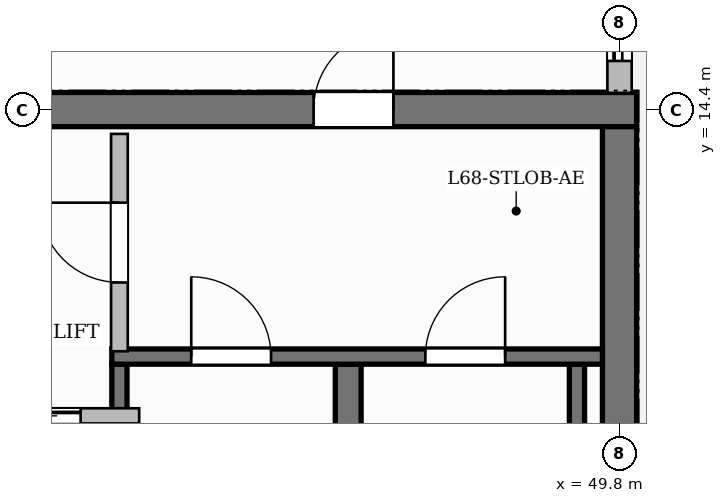
"""IFC4 building model, lengths in metres.
Left out: names, types, materials, properties, quantities, classifications, styles, units other than length and angle.
Written with IfcOpenShell. Run it as: python <this file> out.ifc"""

import sys

from ifc_helpers import new_model, si_unit, direction, frame, frame_2d, origin, place, context, subcontext, project, spatial, rectangle, extrude, source, transform, mapped, element, fill, save


model = new_model("IFC4")
c1 = context("Model", 3, precision=1e-05, world=origin(), true_north=direction((0.0, 1.0)))
c2 = subcontext(c1, "Body", "Model", "MODEL_VIEW")
j1 = project(units=[si_unit("LENGTHUNIT", "METRE"), si_unit("PLANEANGLEUNIT", "RADIAN")], contexts=[c1])
p1 = place(None, origin())
s1 = spatial("IfcSite", under=j1, at=p1, CompositionType="ELEMENT")
p2 = place(p1, origin())
s2 = spatial("IfcBuilding", under=s1, at=p2, CompositionType="ELEMENT")
p3 = place(p2, frame((0.0, 0.0, 271.2)))
s3 = spatial("IfcBuildingStorey", under=s2, at=p3, CompositionType="ELEMENT", Elevation=271.2)
p4 = place(p3, frame((34.575, 14.4, 0.0), z_axis=(0.0, 0.0, 1.0), x_axis=(1.0, 0.0, 0.0)))
e1 = element("IfcWall", 1, at=p4, inside=s3, PredefinedType="SHEAR", context=c2, shape_type="SweptSolid", body=[
    extrude(rectangle(XDim=15.45, YDim=0.45, at=frame_2d((7.725, 0.0))), origin(), (0.0, 0.0, 1.0), 3.85),
])
p5 = place(p4, frame((5.355, 0.0, 0.0)))
e2 = element("IfcOpeningElement", 2, at=p5, cuts=e1, PredefinedType="OPENING", context=c2, shape_type="SweptSolid", body=[
    extrude(rectangle(XDim=1.5, YDim=2.2, at=frame_2d((0.75, 1.1))), frame((0.0, 0.235, 0.0), z_axis=(0.0, -1.0, 0.0), x_axis=(1.0, 0.0, 0.0)), (0.0, 0.0, 1.0), 0.47),
])
p6 = place(p4, frame((1.57, 0.0, 0.0)))
e3 = element("IfcOpeningElement", 3, at=p6, cuts=e1, PredefinedType="OPENING", context=c2, shape_type="SweptSolid", body=[
    extrude(rectangle(XDim=1.05, YDim=2.15, at=frame_2d((0.525, 1.075))), frame((0.0, 0.235, 0.0), z_axis=(0.0, -1.0, 0.0), x_axis=(1.0, 0.0, 0.0)), (0.0, 0.0, 1.0), 0.47),
])
p7 = place(p4, frame((11.2, 0.0, 0.0)))
e4 = element("IfcOpeningElement", 4, at=p7, cuts=e1, PredefinedType="OPENING", context=c2, shape_type="SweptSolid", body=[
    extrude(rectangle(XDim=1.05, YDim=2.15, at=frame_2d((0.525, 1.075))), frame((0.0, 0.235, 0.0), z_axis=(0.0, -1.0, 0.0), x_axis=(1.0, 0.0, 0.0)), (0.0, 0.0, 1.0), 0.47),
])
p8 = place(p3, frame((49.8, 3.825, 0.0), z_axis=(0.0, 0.0, 1.0), x_axis=(0.0, 1.0, 0.0)))
e5 = element("IfcWall", 5, at=p8, inside=s3, PredefinedType="SHEAR", context=c2, shape_type="SweptSolid", body=[
    extrude(rectangle(XDim=10.35, YDim=0.45, at=frame_2d((5.175, 0.0))), origin(), (0.0, 0.0, 1.0), 3.85),
])
p9 = place(p3, frame((43.22, 4.1, 0.0), z_axis=(0.0, 0.0, 1.0), x_axis=(0.0, 1.0, 0.0)))
e6 = element("IfcWall", 6, at=p9, inside=s3, PredefinedType="SHEAR", context=c2, shape_type="SweptSolid", body=[
    extrude(rectangle(XDim=6.95, YDim=0.2, at=frame_2d((3.475, 0.0))), origin(), (0.0, 0.0, 1.0), 3.85),
])
p10 = place(p3, frame((46.23, 4.1, 0.0), z_axis=(0.0, 0.0, 1.0), x_axis=(0.0, 1.0, 0.0)))
e7 = element("IfcWall", 7, at=p10, inside=s3, PredefinedType="SHEAR", context=c2, shape_type="SweptSolid", body=[
    extrude(rectangle(XDim=6.95, YDim=0.34, at=frame_2d((3.475, 0.0))), origin(), (0.0, 0.0, 1.0), 3.85),
])
p11 = place(p3, frame((49.24, 4.1, 0.0), z_axis=(0.0, 0.0, 1.0), x_axis=(0.0, 1.0, 0.0)))
e8 = element("IfcWall", 8, at=p11, inside=s3, PredefinedType="SHEAR", context=c2, shape_type="SweptSolid", body=[
    extrude(rectangle(XDim=6.95, YDim=0.2, at=frame_2d((3.475, 0.0))), origin(), (0.0, 0.0, 1.0), 3.85),
])
p12 = place(p3, frame((43.12, 11.15, 0.0), z_axis=(0.0, 0.0, 1.0), x_axis=(1.0, 0.0, 0.0)))
e9 = element("IfcWall", 9, at=p12, inside=s3, PredefinedType="SHEAR", context=c2, shape_type="SweptSolid", body=[
    extrude(rectangle(XDim=6.455, YDim=0.2, at=frame_2d((3.228, 0.0))), origin(), (0.0, 0.0, 1.0), 3.85),
])
p13 = place(p12, frame((1.045, 0.0, 0.0)))
e10 = element("IfcOpeningElement", 10, at=p13, cuts=e9, PredefinedType="OPENING", context=c2, shape_type="SweptSolid", body=[
    extrude(rectangle(XDim=1.05, YDim=2.2, at=frame_2d((0.525, 1.1))), frame((0.0, 0.11, 0.0), z_axis=(0.0, -1.0, 0.0), x_axis=(1.0, 0.0, 0.0)), (0.0, 0.0, 1.0), 0.22),
])
p14 = place(p12, frame((4.125, 0.0, 0.0)))
e11 = element("IfcOpeningElement", 11, at=p14, cuts=e9, PredefinedType="OPENING", context=c2, shape_type="SweptSolid", body=[
    extrude(rectangle(XDim=1.05, YDim=2.2, at=frame_2d((0.525, 1.1))), frame((0.0, 0.11, 0.0), z_axis=(0.0, -1.0, 0.0), x_axis=(1.0, 0.0, 0.0)), (0.0, 0.0, 1.0), 0.22),
])
p15 = place(p3, frame((43.22, 11.22, 0.0), z_axis=(0.0, 0.0, 1.0), x_axis=(0.0, 1.0, 0.0)))
e12 = element("IfcWall", 12, at=p15, inside=s3, PredefinedType="PARTITIONING", context=c2, shape_type="SweptSolid", body=[
    extrude(rectangle(XDim=2.86, YDim=0.22, at=frame_2d((1.43, 0.0))), origin(), (0.0, 0.0, 1.0), 3.6),
])
p16 = place(p15, frame((0.905, 0.0, 0.0)))
e13 = element("IfcOpeningElement", 13, at=p16, cuts=e12, PredefinedType="OPENING", context=c2, shape_type="SweptSolid", body=[
    extrude(rectangle(XDim=1.05, YDim=2.15, at=frame_2d((0.525, 1.075))), frame((0.0, 0.12, 0.0), z_axis=(0.0, -1.0, 0.0), x_axis=(1.0, 0.0, 0.0)), (0.0, 0.0, 1.0), 0.24),
])
p17 = place(p3, frame((40.84, 10.37, 0.0), z_axis=(0.0, 0.0, 1.0), x_axis=(1.0, 0.0, 0.0)))
e14 = element("IfcWall", 14, at=p17, inside=s3, PredefinedType="PARTITIONING", context=c2, shape_type="SweptSolid", body=[
    extrude(rectangle(XDim=2.64, YDim=0.2, at=frame_2d((1.32, 0.0))), origin(), (0.0, 0.0, 1.0), 3.6),
])
p18 = place(p17, frame((0.77, 0.0, 0.0)))
e15 = element("IfcOpeningElement", 15, at=p18, cuts=e14, PredefinedType="OPENING", context=c2, shape_type="SweptSolid", body=[
    extrude(rectangle(XDim=1.1, YDim=2.2, at=frame_2d((0.55, 1.1))), frame((0.0, 0.11, 0.0), z_axis=(0.0, -1.0, 0.0), x_axis=(1.0, 0.0, 0.0)), (0.0, 0.0, 1.0), 0.22),
])
p19 = place(p3, frame((49.8, 14.62, 0.0), z_axis=(0.0, 0.0, 1.0), x_axis=(0.0, 1.0, 0.0)))
e16 = element("IfcWall", 16, at=p19, inside=s3, PredefinedType="SOLIDWALL", context=c2, shape_type="SweptSolid", body=[
    extrude(rectangle(XDim=6.93, YDim=0.32, at=frame_2d((3.465, 0.0))), origin(), (0.0, 0.0, 1.0), 3.185),
])
p20 = place(p19, frame((0.42, 0.0, 0.0)))
e17 = element("IfcOpeningElement", 17, at=p20, cuts=e16, PredefinedType="OPENING", context=c2, shape_type="SweptSolid", body=[
    extrude(rectangle(XDim=1.2, YDim=2.2, at=frame_2d((0.6, 1.1))), frame((0.0, 0.17, 0.0), z_axis=(0.0, -1.0, 0.0), x_axis=(1.0, 0.0, 0.0)), (0.0, 0.0, 1.0), 0.34),
])
p21 = place(p19, frame((3.659, 0.0, 0.8)))
e18 = element("IfcOpeningElement", 18, at=p21, cuts=e16, PredefinedType="OPENING", context=c2, shape_type="SweptSolid", body=[
    extrude(rectangle(XDim=1.8, YDim=1.85, at=frame_2d((0.9, 0.925))), frame((0.0, 0.17, 0.0), z_axis=(0.0, -1.0, 0.0), x_axis=(1.0, 0.0, 0.0)), (0.0, 0.0, 1.0), 0.34),
])
m1 = source(origin(), c2, "Body", "SweptSolid", [
    extrude(rectangle(XDim=1.05, YDim=2.2, at=frame_2d((0.525, 1.1))), frame((0.0, 0.025, 0.0), z_axis=(0.0, -1.0, 0.0), x_axis=(1.0, 0.0, 0.0)), (0.0, 0.0, 1.0), 0.05),
])
p22 = place(p13, origin())
e19 = element("IfcDoor", 19, at=p22, inside=s3, OperationType="SINGLE_SWING_LEFT", PredefinedType="DOOR", context=c2, shape_type="MappedRepresentation", body=[
    mapped(m1, transform((0.0, 0.0, 0.0), scale=1.0)),
])
fill(e10, e19)
p23 = place(p14, origin())
e20 = element("IfcDoor", 20, at=p23, inside=s3, OperationType="SINGLE_SWING_RIGHT", PredefinedType="DOOR", context=c2, shape_type="MappedRepresentation", body=[
    mapped(m1, transform((0.0, 0.0, 0.0), scale=1.0)),
])
fill(e11, e20)
m2 = source(origin(), c2, "Body", "SweptSolid", [
    extrude(rectangle(XDim=1.05, YDim=2.15, at=frame_2d((0.525, 1.075))), frame((0.0, 0.025, 0.0), z_axis=(0.0, -1.0, 0.0), x_axis=(1.0, 0.0, 0.0)), (0.0, 0.0, 1.0), 0.05),
])
p24 = place(p16, origin())
e21 = element("IfcDoor", 21, at=p24, inside=s3, OperationType="SINGLE_SWING_RIGHT", PredefinedType="DOOR", context=c2, shape_type="MappedRepresentation", body=[
    mapped(m2, transform((0.0, 0.0, 0.0), scale=1.0)),
])
fill(e13, e21)
p25 = place(p7, origin())
e22 = element("IfcDoor", 22, at=p25, inside=s3, OperationType="SINGLE_SWING_RIGHT", PredefinedType="DOOR", context=c2, shape_type="MappedRepresentation", body=[
    mapped(m2, transform((0.0, 0.0, 0.0), scale=1.0)),
])
fill(e4, e22)
m3 = source(origin(), c2, "Body", "SweptSolid", [
    extrude(rectangle(XDim=1.1, YDim=2.2, at=frame_2d((0.55, 1.1))), frame((0.0, 0.025, 0.0), z_axis=(0.0, -1.0, 0.0), x_axis=(1.0, 0.0, 0.0)), (0.0, 0.0, 1.0), 0.05),
])
p26 = place(p18, origin())
e23 = element("IfcDoor", 23, at=p26, inside=s3, OperationType="SLIDING_TO_LEFT", PredefinedType="DOOR", context=c2, shape_type="MappedRepresentation", body=[
    mapped(m3, transform((0.0, 0.0, 0.0), scale=1.0)),
])
fill(e15, e23)
m4 = source(origin(), c2, "Body", "SweptSolid", [
    extrude(rectangle(XDim=1.2, YDim=2.2, at=frame_2d((0.6, 1.1))), frame((0.0, 0.025, 0.0), z_axis=(0.0, -1.0, 0.0), x_axis=(1.0, 0.0, 0.0)), (0.0, 0.0, 1.0), 0.05),
])
p27 = place(p20, origin())
e24 = element("IfcDoor", 24, at=p27, inside=s3, OperationType="SLIDING_TO_LEFT", PredefinedType="DOOR", context=c2, shape_type="MappedRepresentation", body=[
    mapped(m4, transform((0.0, 0.0, 0.0), scale=1.0)),
])
fill(e17, e24)
save(model, sys.argv[1])
